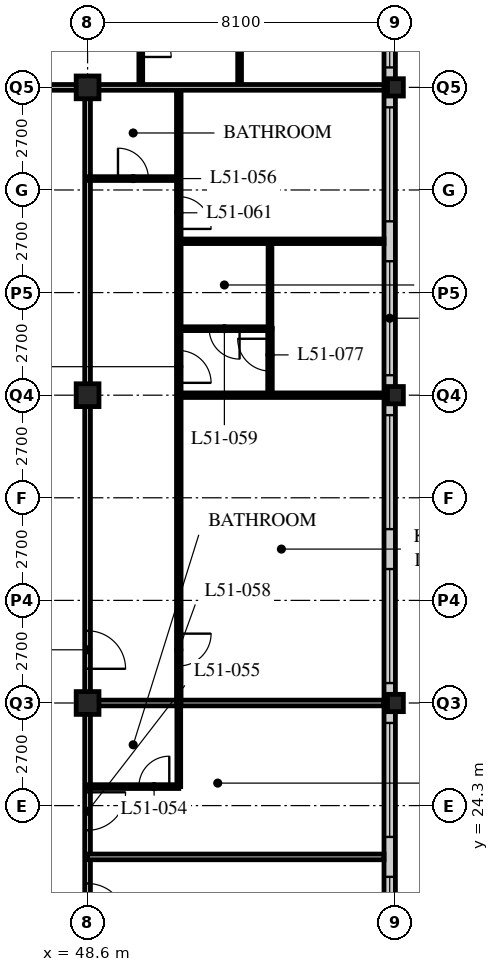
"""IFC4 building model, lengths in metres.
Left out: names, types, materials, properties, quantities, classifications, styles, units other than length and angle.
Written with IfcOpenShell. Run it as: python <this file> out.ifc"""

import sys

from ifc_helpers import new_model, si_unit, direction, frame, frame_2d, origin, origin_2d, place, context, subcontext, project, spatial, rectangle, hollow_rectangle, i_section, extrude, element, fill, save


model = new_model("IFC4")
c1 = context("Model", 3, precision=1e-05, world=origin(), true_north=direction((0.0, 1.0)))
c2 = subcontext(c1, "Body", "Model", "MODEL_VIEW")
j1 = project(units=[si_unit("LENGTHUNIT", "METRE"), si_unit("PLANEANGLEUNIT", "RADIAN")], contexts=[c1])
p1 = place(None, origin())
s1 = spatial("IfcSite", under=j1, at=p1, CompositionType="ELEMENT")
p2 = place(p1, origin())
s2 = spatial("IfcBuilding", under=s1, at=p2, CompositionType="ELEMENT")
p3 = place(p2, frame((0.0, 0.0, 199.2)))
s3 = spatial("IfcBuildingStorey", under=s2, at=p3, CompositionType="ELEMENT", Elevation=199.2)
for number, where, z_axis, x_axis in (
    (1, (48.6, 27.0, 0.0), (0.0, 0.0, 1.0), (1.0, 0.0, 0.0)),
    (2, (48.6, 35.1, 0.0), (0.0, 0.0, 1.0), (1.0, 0.0, 0.0)),
    (3, (48.6, 43.2, 0.0), (0.0, 0.0, 1.0), (1.0, 0.0, 0.0)),
):
    element("IfcColumn", number, at=place(p3, frame(where, z_axis=z_axis, x_axis=x_axis)), inside=s3, PredefinedType="COLUMN", context=c2, shape_type="SweptSolid", body=[
        extrude(hollow_rectangle(XDim=0.6, YDim=0.6, WallThickness=0.05, at=origin_2d()), origin(), (0.0, 0.0, 1.0), 3.6),
    ])
for number, where, z_axis, x_axis in (
    (4, (56.7, 27.0, 0.0), (0.0, 0.0, 1.0), (1.0, 0.0, 0.0)),
    (5, (56.7, 35.1, 0.0), (0.0, 0.0, 1.0), (1.0, 0.0, 0.0)),
    (6, (56.7, 43.2, 0.0), (0.0, 0.0, 1.0), (1.0, 0.0, 0.0)),
):
    element("IfcColumn", number, at=place(p3, frame(where, z_axis=z_axis, x_axis=x_axis)), inside=s3, PredefinedType="COLUMN", context=c2, shape_type="SweptSolid", body=[
        extrude(i_section(OverallWidth=0.418, OverallDepth=0.456, WebThickness=0.042, FlangeThickness=0.067, FilletRadius=0.015, at=origin_2d()), origin(), (0.0, 0.0, 1.0), 3.6),
    ])
p4 = place(p3, frame((56.55, 19.2, 0.0), z_axis=(0.0, 0.0, 1.0), x_axis=(0.0, 1.0, 0.0)))
e7 = element("IfcWall", 7, at=p4, inside=s3, PredefinedType="SOLIDWALL", context=c2, shape_type="SweptSolid", body=[
    extrude(rectangle(XDim=32.1, YDim=0.3, at=frame_2d((16.05, 0.0))), origin(), (0.0, 0.0, 1.0), 3.39),
])
p5 = place(p4, frame((0.225, 0.0, 0.6)))
e8 = element("IfcOpeningElement", 8, at=p5, cuts=e7, PredefinedType="OPENING", context=c2, shape_type="SweptSolid", body=[
    extrude(rectangle(XDim=3.0, YDim=2.4, at=frame_2d((1.5, 1.2))), frame((0.0, 0.16, 0.0), z_axis=(0.0, -1.0, 0.0), x_axis=(1.0, 0.0, 0.0)), (0.0, 0.0, 1.0), 0.32),
])
p6 = place(p4, frame((4.275, 0.0, 0.6)))
e9 = element("IfcOpeningElement", 9, at=p6, cuts=e7, PredefinedType="OPENING", context=c2, shape_type="SweptSolid", body=[
    extrude(rectangle(XDim=3.0, YDim=2.4, at=frame_2d((1.5, 1.2))), frame((0.0, 0.16, 0.0), z_axis=(0.0, -1.0, 0.0), x_axis=(1.0, 0.0, 0.0)), (0.0, 0.0, 1.0), 0.32),
])
p7 = place(p4, frame((8.325, 0.0, 0.6)))
e10 = element("IfcOpeningElement", 10, at=p7, cuts=e7, PredefinedType="OPENING", context=c2, shape_type="SweptSolid", body=[
    extrude(rectangle(XDim=3.0, YDim=2.4, at=frame_2d((1.5, 1.2))), frame((0.0, 0.16, 0.0), z_axis=(0.0, -1.0, 0.0), x_axis=(1.0, 0.0, 0.0)), (0.0, 0.0, 1.0), 0.32),
])
p8 = place(p4, frame((12.375, 0.0, 0.6)))
e11 = element("IfcOpeningElement", 11, at=p8, cuts=e7, PredefinedType="OPENING", context=c2, shape_type="SweptSolid", body=[
    extrude(rectangle(XDim=3.0, YDim=2.4, at=frame_2d((1.5, 1.2))), frame((0.0, 0.16, 0.0), z_axis=(0.0, -1.0, 0.0), x_axis=(1.0, 0.0, 0.0)), (0.0, 0.0, 1.0), 0.32),
])
p9 = place(p4, frame((16.425, 0.0, 0.6)))
e12 = element("IfcOpeningElement", 12, at=p9, cuts=e7, PredefinedType="OPENING", context=c2, shape_type="SweptSolid", body=[
    extrude(rectangle(XDim=3.0, YDim=2.4, at=frame_2d((1.5, 1.2))), frame((0.0, 0.16, 0.0), z_axis=(0.0, -1.0, 0.0), x_axis=(1.0, 0.0, 0.0)), (0.0, 0.0, 1.0), 0.32),
])
p10 = place(p4, frame((20.475, 0.0, 0.6)))
e13 = element("IfcOpeningElement", 13, at=p10, cuts=e7, PredefinedType="OPENING", context=c2, shape_type="SweptSolid", body=[
    extrude(rectangle(XDim=3.0, YDim=2.4, at=frame_2d((1.5, 1.2))), frame((0.0, 0.16, 0.0), z_axis=(0.0, -1.0, 0.0), x_axis=(1.0, 0.0, 0.0)), (0.0, 0.0, 1.0), 0.32),
])
p11 = place(p4, frame((24.525, 0.0, 0.6)))
e14 = element("IfcOpeningElement", 14, at=p11, cuts=e7, PredefinedType="OPENING", context=c2, shape_type="SweptSolid", body=[
    extrude(rectangle(XDim=3.0, YDim=2.4, at=frame_2d((1.5, 1.2))), frame((0.0, 0.16, 0.0), z_axis=(0.0, -1.0, 0.0), x_axis=(1.0, 0.0, 0.0)), (0.0, 0.0, 1.0), 0.32),
])
p12 = place(p4, frame((28.575, 0.0, 0.6)))
e15 = element("IfcOpeningElement", 15, at=p12, cuts=e7, PredefinedType="OPENING", context=c2, shape_type="SweptSolid", body=[
    extrude(rectangle(XDim=3.0, YDim=2.4, at=frame_2d((1.5, 1.2))), frame((0.0, 0.16, 0.0), z_axis=(0.0, -1.0, 0.0), x_axis=(1.0, 0.0, 0.0)), (0.0, 0.0, 1.0), 0.32),
])
p13 = place(p3, frame((8.1, 43.2, 0.0), z_axis=(0.0, 0.0, 1.0), x_axis=(1.0, 0.0, 0.0)))
e16 = element("IfcWall", 16, at=p13, inside=s3, PredefinedType="PARTITIONING", context=c2, shape_type="SweptSolid", body=[
    extrude(rectangle(XDim=40.5, YDim=0.15, at=frame_2d((20.25, 0.0))), origin(), (0.0, 0.0, 1.0), 2.778),
])
p14 = place(p13, frame((4.45, 0.0, 0.0)))
e17 = element("IfcOpeningElement", 17, at=p14, cuts=e16, PredefinedType="OPENING", context=c2, shape_type="SweptSolid", body=[
    extrude(rectangle(XDim=1.0, YDim=2.1, at=frame_2d((0.5, 1.05))), frame((0.0, 0.085, 0.0), z_axis=(0.0, -1.0, 0.0), x_axis=(1.0, 0.0, 0.0)), (0.0, 0.0, 1.0), 0.17),
])
p15 = place(p13, frame((20.65, 0.0, 0.0)))
e18 = element("IfcOpeningElement", 18, at=p15, cuts=e16, PredefinedType="OPENING", context=c2, shape_type="SweptSolid", body=[
    extrude(rectangle(XDim=1.0, YDim=2.1, at=frame_2d((0.5, 1.05))), frame((0.0, 0.085, 0.0), z_axis=(0.0, -1.0, 0.0), x_axis=(1.0, 0.0, 0.0)), (0.0, 0.0, 1.0), 0.17),
])
p16 = place(p13, frame((28.75, 0.0, 0.0)))
e19 = element("IfcOpeningElement", 19, at=p16, cuts=e16, PredefinedType="OPENING", context=c2, shape_type="SweptSolid", body=[
    extrude(rectangle(XDim=1.0, YDim=2.1, at=frame_2d((0.5, 1.05))), frame((0.0, 0.085, 0.0), z_axis=(0.0, -1.0, 0.0), x_axis=(1.0, 0.0, 0.0)), (0.0, 0.0, 1.0), 0.17),
])
p17 = place(p13, frame((37.975, 0.0, 0.0)))
e20 = element("IfcOpeningElement", 20, at=p17, cuts=e16, PredefinedType="OPENING", context=c2, shape_type="SweptSolid", body=[
    extrude(rectangle(XDim=1.0, YDim=2.1, at=frame_2d((0.5, 1.05))), frame((0.0, 0.085, 0.0), z_axis=(0.0, -1.0, 0.0), x_axis=(1.0, 0.0, 0.0)), (0.0, 0.0, 1.0), 0.17),
])
p18 = place(p13, frame((1.525, 0.0, 0.0)))
e21 = element("IfcOpeningElement", 21, at=p18, cuts=e16, PredefinedType="OPENING", context=c2, shape_type="SweptSolid", body=[
    extrude(rectangle(XDim=1.0, YDim=2.1, at=frame_2d((0.5, 1.05))), frame((0.0, 0.085, 0.0), z_axis=(0.0, -1.0, 0.0), x_axis=(1.0, 0.0, 0.0)), (0.0, 0.0, 1.0), 0.17),
])
p19 = place(p3, frame((48.6, 18.9, 0.0), z_axis=(0.0, 0.0, 1.0), x_axis=(0.0, 1.0, 0.0)))
e22 = element("IfcWall", 22, at=p19, inside=s3, PredefinedType="PARTITIONING", context=c2, shape_type="SweptSolid", body=[
    extrude(rectangle(XDim=24.3, YDim=0.15, at=frame_2d((12.15, 0.0))), origin(), (0.0, 0.0, 1.0), 2.778),
])
p20 = place(p19, frame((2.35, 0.0, 0.0)))
e23 = element("IfcOpeningElement", 23, at=p20, cuts=e22, PredefinedType="OPENING", context=c2, shape_type="SweptSolid", body=[
    extrude(rectangle(XDim=1.0, YDim=2.1, at=frame_2d((0.5, 1.05))), frame((0.0, 0.085, 0.0), z_axis=(0.0, -1.0, 0.0), x_axis=(1.0, 0.0, 0.0)), (0.0, 0.0, 1.0), 0.17),
])
p21 = place(p19, frame((4.75, 0.0, 0.0)))
e24 = element("IfcOpeningElement", 24, at=p21, cuts=e22, PredefinedType="OPENING", context=c2, shape_type="SweptSolid", body=[
    extrude(rectangle(XDim=1.0, YDim=2.1, at=frame_2d((0.5, 1.05))), frame((0.0, 0.085, 0.0), z_axis=(0.0, -1.0, 0.0), x_axis=(1.0, 0.0, 0.0)), (0.0, 0.0, 1.0), 0.17),
])
p22 = place(p19, frame((9.0, 0.0, 0.0)))
e25 = element("IfcOpeningElement", 25, at=p22, cuts=e22, PredefinedType="OPENING", context=c2, shape_type="SweptSolid", body=[
    extrude(rectangle(XDim=1.0, YDim=2.1, at=frame_2d((0.5, 1.05))), frame((0.0, 0.085, 0.0), z_axis=(0.0, -1.0, 0.0), x_axis=(1.0, 0.0, 0.0)), (0.0, 0.0, 1.0), 0.17),
])
p23 = place(p3, frame((48.6, 22.95, 0.0), z_axis=(0.0, 0.0, 1.0), x_axis=(1.0, 0.0, 0.0)))
e26 = element("IfcWall", 26, at=p23, inside=s3, PredefinedType="PARTITIONING", context=c2, shape_type="SweptSolid", body=[
    extrude(rectangle(XDim=7.8, YDim=0.15, at=frame_2d((3.9, 0.0))), origin(), (0.0, 0.0, 1.0), 3.39),
])
p24 = place(p3, frame((51.0, 24.8, 0.0), z_axis=(0.0, 0.0, 1.0), x_axis=(0.0, 1.0, 0.0)))
e27 = element("IfcWall", 27, at=p24, inside=s3, PredefinedType="PARTITIONING", context=c2, shape_type="SweptSolid", body=[
    extrude(rectangle(XDim=2.2, YDim=0.1, at=frame_2d((1.1, 0.0))), origin(), (0.0, 0.0, 1.0), 3.39),
])
p25 = place(p3, frame((48.6, 24.8, 0.0), z_axis=(0.0, 0.0, 1.0), x_axis=(1.0, 0.0, 0.0)))
e28 = element("IfcWall", 28, at=p25, inside=s3, PredefinedType="PARTITIONING", context=c2, shape_type="SweptSolid", body=[
    extrude(rectangle(XDim=2.4, YDim=0.1, at=frame_2d((1.2, 0.0))), origin(), (0.0, 0.0, 1.0), 3.39),
])
p26 = place(p25, frame((1.35, 0.0, 0.0)))
e29 = element("IfcOpeningElement", 29, at=p26, cuts=e28, PredefinedType="OPENING", context=c2, shape_type="SweptSolid", body=[
    extrude(rectangle(XDim=0.8, YDim=2.1, at=frame_2d((0.4, 1.05))), frame((0.0, 0.06, 0.0), z_axis=(0.0, -1.0, 0.0), x_axis=(1.0, 0.0, 0.0)), (0.0, 0.0, 1.0), 0.12),
])
p27 = place(p3, frame((48.6, 27.0, 0.0), z_axis=(0.0, 0.0, 1.0), x_axis=(1.0, 0.0, 0.0)))
e30 = element("IfcWall", 30, at=p27, inside=s3, PredefinedType="PARTITIONING", context=c2, shape_type="SweptSolid", body=[
    extrude(rectangle(XDim=7.8, YDim=0.15, at=frame_2d((3.9, 0.0))), origin(), (0.0, 0.0, 1.0), 2.778),
])
p28 = place(p3, frame((51.0, 27.0, 0.0), z_axis=(0.0, 0.0, 1.0), x_axis=(0.0, 1.0, 0.0)))
e31 = element("IfcWall", 31, at=p28, inside=s3, PredefinedType="PARTITIONING", context=c2, shape_type="SweptSolid", body=[
    extrude(rectangle(XDim=16.2, YDim=0.12, at=frame_2d((8.1, 0.0))), origin(), (0.0, 0.0, 1.0), 3.39),
])
p29 = place(p28, frame((0.975, 0.0, 0.0)))
e32 = element("IfcOpeningElement", 32, at=p29, cuts=e31, PredefinedType="OPENING", context=c2, shape_type="SweptSolid", body=[
    extrude(rectangle(XDim=0.85, YDim=2.1, at=frame_2d((0.425, 1.05))), frame((0.0, 0.07, 0.0), z_axis=(0.0, -1.0, 0.0), x_axis=(1.0, 0.0, 0.0)), (0.0, 0.0, 1.0), 0.14),
])
p30 = place(p28, frame((8.425, 0.0, 0.0)))
e33 = element("IfcOpeningElement", 33, at=p30, cuts=e31, PredefinedType="OPENING", context=c2, shape_type="SweptSolid", body=[
    extrude(rectangle(XDim=0.85, YDim=2.1, at=frame_2d((0.425, 1.05))), frame((0.0, 0.07, 0.0), z_axis=(0.0, -1.0, 0.0), x_axis=(1.0, 0.0, 0.0)), (0.0, 0.0, 1.0), 0.14),
])
p31 = place(p28, frame((12.475, 0.0, 0.0)))
e34 = element("IfcOpeningElement", 34, at=p31, cuts=e31, PredefinedType="OPENING", context=c2, shape_type="SweptSolid", body=[
    extrude(rectangle(XDim=0.85, YDim=2.1, at=frame_2d((0.425, 1.05))), frame((0.0, 0.07, 0.0), z_axis=(0.0, -1.0, 0.0), x_axis=(1.0, 0.0, 0.0)), (0.0, 0.0, 1.0), 0.14),
])
p32 = place(p3, frame((48.6, 40.8, 0.0), z_axis=(0.0, 0.0, 1.0), x_axis=(1.0, 0.0, 0.0)))
e35 = element("IfcWall", 35, at=p32, inside=s3, PredefinedType="PARTITIONING", context=c2, shape_type="SweptSolid", body=[
    extrude(rectangle(XDim=2.4, YDim=0.1, at=frame_2d((1.2, 0.0))), origin(), (0.0, 0.0, 1.0), 3.39),
])
p33 = place(p32, frame((0.8, 0.0, 0.0)))
e36 = element("IfcOpeningElement", 36, at=p33, cuts=e35, PredefinedType="OPENING", context=c2, shape_type="SweptSolid", body=[
    extrude(rectangle(XDim=0.8, YDim=2.1, at=frame_2d((0.4, 1.05))), frame((0.0, 0.06, 0.0), z_axis=(0.0, -1.0, 0.0), x_axis=(1.0, 0.0, 0.0)), (0.0, 0.0, 1.0), 0.12),
])
p34 = place(p3, frame((51.0, 36.85, 0.0), z_axis=(0.0, 0.0, 1.0), x_axis=(1.0, 0.0, 0.0)))
e37 = element("IfcWall", 37, at=p34, inside=s3, PredefinedType="PARTITIONING", context=c2, shape_type="SweptSolid", body=[
    extrude(rectangle(XDim=2.4, YDim=0.1, at=frame_2d((1.2, 0.0))), origin(), (0.0, 0.0, 1.0), 3.39),
])
p35 = place(p34, frame((0.8, 0.0, 0.0)))
e38 = element("IfcOpeningElement", 38, at=p35, cuts=e37, PredefinedType="OPENING", context=c2, shape_type="SweptSolid", body=[
    extrude(rectangle(XDim=0.8, YDim=2.1, at=frame_2d((0.4, 1.05))), frame((0.0, 0.06, 0.0), z_axis=(0.0, -1.0, 0.0), x_axis=(1.0, 0.0, 0.0)), (0.0, 0.0, 1.0), 0.12),
])
p36 = place(p3, frame((53.4, 36.85, 0.0), z_axis=(0.0, 0.0, 1.0), x_axis=(0.0, 1.0, 0.0)))
e39 = element("IfcWall", 39, at=p36, inside=s3, PredefinedType="PARTITIONING", context=c2, shape_type="SweptSolid", body=[
    extrude(rectangle(XDim=2.3, YDim=0.1, at=frame_2d((1.15, 0.0))), origin(), (0.0, 0.0, 1.0), 3.39),
])
p37 = place(p3, frame((51.0, 35.1, 0.0), z_axis=(0.0, 0.0, 1.0), x_axis=(1.0, 0.0, 0.0)))
e40 = element("IfcWall", 40, at=p37, inside=s3, PredefinedType="PARTITIONING", context=c2, shape_type="SweptSolid", body=[
    extrude(rectangle(XDim=5.4, YDim=0.12, at=frame_2d((2.7, 0.0))), origin(), (0.0, 0.0, 1.0), 2.778),
])
p38 = place(p3, frame((51.0, 39.15, 0.0), z_axis=(0.0, 0.0, 1.0), x_axis=(1.0, 0.0, 0.0)))
e41 = element("IfcWall", 41, at=p38, inside=s3, PredefinedType="PARTITIONING", context=c2, shape_type="SweptSolid", body=[
    extrude(rectangle(XDim=5.4, YDim=0.12, at=frame_2d((2.7, 0.0))), origin(), (0.0, 0.0, 1.0), 3.39),
])
p39 = place(p3, frame((50.0, 43.2, 0.0), z_axis=(0.0, 0.0, 1.0), x_axis=(0.0, 1.0, 0.0)))
e42 = element("IfcWall", 42, at=p39, inside=s3, PredefinedType="PARTITIONING", context=c2, shape_type="SweptSolid", body=[
    extrude(rectangle(XDim=2.4, YDim=0.1, at=frame_2d((1.2, 0.0))), origin(), (0.0, 0.0, 1.0), 3.39),
])
p40 = place(p39, frame((0.8, 0.0, 0.0)))
e43 = element("IfcOpeningElement", 43, at=p40, cuts=e42, PredefinedType="OPENING", context=c2, shape_type="SweptSolid", body=[
    extrude(rectangle(XDim=0.8, YDim=2.1, at=frame_2d((0.4, 1.05))), frame((0.0, 0.06, 0.0), z_axis=(0.0, -1.0, 0.0), x_axis=(1.0, 0.0, 0.0)), (0.0, 0.0, 1.0), 0.12),
])
p41 = place(p3, frame((52.6, 43.2, 0.0), z_axis=(0.0, 0.0, 1.0), x_axis=(0.0, 1.0, 0.0)))
e44 = element("IfcWall", 44, at=p41, inside=s3, PredefinedType="PARTITIONING", context=c2, shape_type="SweptSolid", body=[
    extrude(rectangle(XDim=2.4, YDim=0.1, at=frame_2d((1.2, 0.0))), origin(), (0.0, 0.0, 1.0), 3.39),
])
p42 = place(p3, frame((48.6, 43.2, 0.0), z_axis=(0.0, 0.0, 1.0), x_axis=(1.0, 0.0, 0.0)))
e45 = element("IfcWall", 45, at=p42, inside=s3, PredefinedType="PARTITIONING", context=c2, shape_type="SweptSolid", body=[
    extrude(rectangle(XDim=7.8, YDim=0.15, at=frame_2d((3.9, 0.0))), origin(), (0.0, 0.0, 1.0), 2.778),
])
p43 = place(p3, frame((53.4, 36.86, 0.0), z_axis=(0.0, 0.0, 1.0), x_axis=(0.0, -1.0, 0.0)))
e46 = element("IfcWall", 46, at=p43, inside=s3, PredefinedType="PARTITIONING", context=c2, shape_type="SweptSolid", body=[
    extrude(rectangle(XDim=1.76, YDim=0.12, at=frame_2d((0.88, 0.0))), origin(), (0.0, 0.0, 1.0), 3.39),
])
p44 = place(p43, frame((0.275, 0.0, 0.0)))
e47 = element("IfcOpeningElement", 47, at=p44, cuts=e46, PredefinedType="OPENING", context=c2, shape_type="SweptSolid", body=[
    extrude(rectangle(XDim=0.85, YDim=2.1, at=frame_2d((0.425, 1.05))), frame((0.0, 0.07, 0.0), z_axis=(0.0, -1.0, 0.0), x_axis=(1.0, 0.0, 0.0)), (0.0, 0.0, 1.0), 0.14),
])
p45 = place(p5, origin())
e48 = element("IfcWindow", 48, at=p45, inside=s3, PartitioningType="SINGLE_PANEL", PredefinedType="WINDOW", context=c2, shape_type="SweptSolid", body=[
    extrude(rectangle(XDim=3.0, YDim=2.4, at=frame_2d((1.5, 1.2))), frame((0.0, 0.03, 0.0), z_axis=(0.0, -1.0, 0.0), x_axis=(1.0, 0.0, 0.0)), (0.0, 0.0, 1.0), 0.06),
])
fill(e8, e48)
p46 = place(p6, origin())
e49 = element("IfcWindow", 49, at=p46, inside=s3, PartitioningType="SINGLE_PANEL", PredefinedType="WINDOW", context=c2, shape_type="SweptSolid", body=[
    extrude(rectangle(XDim=3.0, YDim=2.4, at=frame_2d((1.5, 1.2))), frame((0.0, 0.03, 0.0), z_axis=(0.0, -1.0, 0.0), x_axis=(1.0, 0.0, 0.0)), (0.0, 0.0, 1.0), 0.06),
])
fill(e9, e49)
p47 = place(p7, origin())
e50 = element("IfcWindow", 50, at=p47, inside=s3, PartitioningType="SINGLE_PANEL", PredefinedType="WINDOW", context=c2, shape_type="SweptSolid", body=[
    extrude(rectangle(XDim=3.0, YDim=2.4, at=frame_2d((1.5, 1.2))), frame((0.0, 0.03, 0.0), z_axis=(0.0, -1.0, 0.0), x_axis=(1.0, 0.0, 0.0)), (0.0, 0.0, 1.0), 0.06),
])
fill(e10, e50)
p48 = place(p8, origin())
e51 = element("IfcWindow", 51, at=p48, inside=s3, PartitioningType="SINGLE_PANEL", PredefinedType="WINDOW", context=c2, shape_type="SweptSolid", body=[
    extrude(rectangle(XDim=3.0, YDim=2.4, at=frame_2d((1.5, 1.2))), frame((0.0, 0.03, 0.0), z_axis=(0.0, -1.0, 0.0), x_axis=(1.0, 0.0, 0.0)), (0.0, 0.0, 1.0), 0.06),
])
fill(e11, e51)
p49 = place(p9, origin())
e52 = element("IfcWindow", 52, at=p49, inside=s3, PartitioningType="SINGLE_PANEL", PredefinedType="WINDOW", context=c2, shape_type="SweptSolid", body=[
    extrude(rectangle(XDim=3.0, YDim=2.4, at=frame_2d((1.5, 1.2))), frame((0.0, 0.03, 0.0), z_axis=(0.0, -1.0, 0.0), x_axis=(1.0, 0.0, 0.0)), (0.0, 0.0, 1.0), 0.06),
])
fill(e12, e52)
p50 = place(p10, origin())
e53 = element("IfcWindow", 53, at=p50, inside=s3, PartitioningType="SINGLE_PANEL", PredefinedType="WINDOW", context=c2, shape_type="SweptSolid", body=[
    extrude(rectangle(XDim=3.0, YDim=2.4, at=frame_2d((1.5, 1.2))), frame((0.0, 0.03, 0.0), z_axis=(0.0, -1.0, 0.0), x_axis=(1.0, 0.0, 0.0)), (0.0, 0.0, 1.0), 0.06),
])
fill(e13, e53)
p51 = place(p11, origin())
e54 = element("IfcWindow", 54, at=p51, inside=s3, PartitioningType="SINGLE_PANEL", PredefinedType="WINDOW", context=c2, shape_type="SweptSolid", body=[
    extrude(rectangle(XDim=3.0, YDim=2.4, at=frame_2d((1.5, 1.2))), frame((0.0, 0.03, 0.0), z_axis=(0.0, -1.0, 0.0), x_axis=(1.0, 0.0, 0.0)), (0.0, 0.0, 1.0), 0.06),
])
fill(e14, e54)
p52 = place(p20, origin())
e55 = element("IfcDoor", 55, at=p52, inside=s3, OperationType="SINGLE_SWING_RIGHT", PredefinedType="DOOR", context=c2, shape_type="SweptSolid", body=[
    extrude(rectangle(XDim=1.0, YDim=2.1, at=frame_2d((0.5, 1.05))), frame((0.0, 0.025, 0.0), z_axis=(0.0, -1.0, 0.0), x_axis=(1.0, 0.0, 0.0)), (0.0, 0.0, 1.0), 0.05),
])
fill(e23, e55)
p53 = place(p26, origin())
e56 = element("IfcDoor", 56, at=p53, inside=s3, OperationType="SINGLE_SWING_RIGHT", PredefinedType="DOOR", context=c2, shape_type="SweptSolid", body=[
    extrude(rectangle(XDim=0.8, YDim=2.1, at=frame_2d((0.4, 1.05))), frame((0.0, 0.025, 0.0), z_axis=(0.0, -1.0, 0.0), x_axis=(1.0, 0.0, 0.0)), (0.0, 0.0, 1.0), 0.05),
])
fill(e29, e56)
p54 = place(p21, origin())
e57 = element("IfcDoor", 57, at=p54, inside=s3, OperationType="SINGLE_SWING_LEFT", PredefinedType="DOOR", context=c2, shape_type="SweptSolid", body=[
    extrude(rectangle(XDim=1.0, YDim=2.1, at=frame_2d((0.5, 1.05))), frame((0.0, 0.025, 0.0), z_axis=(0.0, -1.0, 0.0), x_axis=(1.0, 0.0, 0.0)), (0.0, 0.0, 1.0), 0.05),
])
fill(e24, e57)
p55 = place(p33, origin())
e58 = element("IfcDoor", 58, at=p55, inside=s3, OperationType="SINGLE_SWING_LEFT", PredefinedType="DOOR", context=c2, shape_type="SweptSolid", body=[
    extrude(rectangle(XDim=0.8, YDim=2.1, at=frame_2d((0.4, 1.05))), frame((0.0, 0.025, 0.0), z_axis=(0.0, -1.0, 0.0), x_axis=(1.0, 0.0, 0.0)), (0.0, 0.0, 1.0), 0.05),
])
fill(e36, e58)
p56 = place(p22, origin())
e59 = element("IfcDoor", 59, at=p56, inside=s3, OperationType="SINGLE_SWING_RIGHT", PredefinedType="DOOR", context=c2, shape_type="SweptSolid", body=[
    extrude(rectangle(XDim=1.0, YDim=2.1, at=frame_2d((0.5, 1.05))), frame((0.0, 0.025, 0.0), z_axis=(0.0, -1.0, 0.0), x_axis=(1.0, 0.0, 0.0)), (0.0, 0.0, 1.0), 0.05),
])
fill(e25, e59)
p57 = place(p29, origin())
e60 = element("IfcDoor", 60, at=p57, inside=s3, OperationType="SINGLE_SWING_LEFT", PredefinedType="DOOR", context=c2, shape_type="SweptSolid", body=[
    extrude(rectangle(XDim=0.85, YDim=2.1, at=frame_2d((0.425, 1.05))), frame((0.0, 0.025, 0.0), z_axis=(0.0, -1.0, 0.0), x_axis=(1.0, 0.0, 0.0)), (0.0, 0.0, 1.0), 0.05),
])
fill(e32, e60)
p58 = place(p35, origin())
e61 = element("IfcDoor", 61, at=p58, inside=s3, OperationType="SINGLE_SWING_LEFT", PredefinedType="DOOR", context=c2, shape_type="SweptSolid", body=[
    extrude(rectangle(XDim=0.8, YDim=2.1, at=frame_2d((0.4, 1.05))), frame((0.0, 0.025, 0.0), z_axis=(0.0, -1.0, 0.0), x_axis=(1.0, 0.0, 0.0)), (0.0, 0.0, 1.0), 0.05),
])
fill(e38, e61)
p59 = place(p30, origin())
e62 = element("IfcDoor", 62, at=p59, inside=s3, OperationType="SINGLE_SWING_RIGHT", PredefinedType="DOOR", context=c2, shape_type="SweptSolid", body=[
    extrude(rectangle(XDim=0.85, YDim=2.1, at=frame_2d((0.425, 1.05))), frame((0.0, 0.025, 0.0), z_axis=(0.0, -1.0, 0.0), x_axis=(1.0, 0.0, 0.0)), (0.0, 0.0, 1.0), 0.05),
])
fill(e33, e62)
p60 = place(p31, origin())
e63 = element("IfcDoor", 63, at=p60, inside=s3, OperationType="SINGLE_SWING_RIGHT", PredefinedType="DOOR", context=c2, shape_type="SweptSolid", body=[
    extrude(rectangle(XDim=0.85, YDim=2.1, at=frame_2d((0.425, 1.05))), frame((0.0, 0.025, 0.0), z_axis=(0.0, -1.0, 0.0), x_axis=(1.0, 0.0, 0.0)), (0.0, 0.0, 1.0), 0.05),
])
fill(e34, e63)
p61 = place(p40, origin())
e64 = element("IfcDoor", 64, at=p61, inside=s3, OperationType="SINGLE_SWING_RIGHT", PredefinedType="DOOR", context=c2, shape_type="SweptSolid", body=[
    extrude(rectangle(XDim=0.8, YDim=2.1, at=frame_2d((0.4, 1.05))), frame((0.0, 0.025, 0.0), z_axis=(0.0, -1.0, 0.0), x_axis=(1.0, 0.0, 0.0)), (0.0, 0.0, 1.0), 0.05),
])
fill(e43, e64)
p62 = place(p44, origin())
e65 = element("IfcDoor", 65, at=p62, inside=s3, OperationType="SINGLE_SWING_RIGHT", PredefinedType="DOOR", context=c2, shape_type="SweptSolid", body=[
    extrude(rectangle(XDim=0.85, YDim=2.1, at=frame_2d((0.425, 1.05))), frame((0.0, 0.025, 0.0), z_axis=(0.0, -1.0, 0.0), x_axis=(1.0, 0.0, 0.0)), (0.0, 0.0, 1.0), 0.05),
])
fill(e47, e65)
save(model, sys.argv[1])
